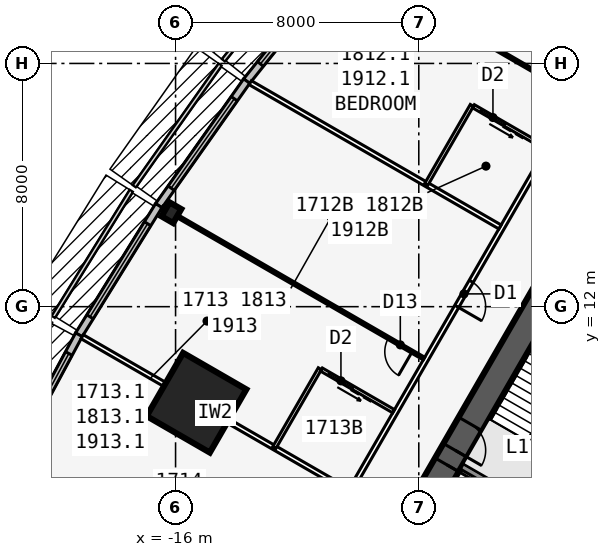
"""IFC4 building model, lengths in metres.
Left out: names, types, materials, properties, quantities, classifications, styles, units other than length and angle.
Written with IfcOpenShell. Run it as: python <this file> out.ifc"""

import sys

from ifc_helpers import new_model, si_unit, direction, frame, frame_2d, origin, origin_2d, place, context, subcontext, project, spatial, rectangle, i_section, extrude, element, fill, save


model = new_model("IFC4")
c1 = context("Model", 3, precision=1e-05, world=origin(), true_north=direction((0.0, 1.0)))
c2 = subcontext(c1, "Body", "Model", "MODEL_VIEW")
j1 = project(units=[si_unit("LENGTHUNIT", "METRE"), si_unit("PLANEANGLEUNIT", "RADIAN")], contexts=[c1])
p1 = place(None, origin())
s1 = spatial("IfcSite", under=j1, at=p1, CompositionType="ELEMENT")
p2 = place(p1, origin())
s2 = spatial("IfcBuilding", under=s1, at=p2, CompositionType="ELEMENT")
p3 = place(p2, frame((0.0, 0.0, 69.3)))
s3 = spatial("IfcBuildingStorey", under=s2, at=p3, CompositionType="ELEMENT", Elevation=69.3)
p4 = place(p3, frame((0.0, 19.052, 0.0), z_axis=(0.0, 0.0, 1.0), x_axis=(-0.499999749417, -0.866025548458, 0.0)))
e1 = element("IfcWall", 1, at=p4, inside=s3, PredefinedType="SHEAR", context=c2, shape_type="SweptSolid", body=[
    extrude(rectangle(XDim=33.0, YDim=0.9, at=frame_2d((16.5, 0.0))), origin(), (0.0, 0.0, 1.0), 3.4),
])
p5 = place(p4, frame((14.15, 0.0, 0.0)))
e2 = element("IfcOpeningElement", 2, at=p5, cuts=e1, PredefinedType="OPENING", context=c2, shape_type="SweptSolid", body=[
    extrude(rectangle(XDim=1.8, YDim=2.13, at=frame_2d((0.9, 1.065))), frame((0.0, 0.46, 0.0), z_axis=(0.0, -1.0, 0.0), x_axis=(1.0, 0.0, 0.0)), (0.0, 0.0, 1.0), 0.92),
])
p6 = place(p4, frame((12.6, 0.0, 0.0)))
e3 = element("IfcOpeningElement", 3, at=p6, cuts=e1, PredefinedType="OPENING", context=c2, shape_type="SweptSolid", body=[
    extrude(rectangle(XDim=1.0, YDim=2.13, at=frame_2d((0.5, 1.065))), frame((0.0, 0.46, 0.0), z_axis=(0.0, -1.0, 0.0), x_axis=(1.0, 0.0, 0.0)), (0.0, 0.0, 1.0), 0.92),
])
p7 = place(p3, frame((-3.879, 5.184, 0.0), z_axis=(0.0, 0.0, 1.0), x_axis=(-0.866022959057, 0.500004234368, 0.0)))
e4 = element("IfcWall", 4, at=p7, inside=s3, PredefinedType="SOLIDWALL", context=c2, shape_type="SweptSolid", body=[
    extrude(rectangle(XDim=3.125, YDim=0.2, at=frame_2d((1.562, 0.0))), origin(), (0.0, 0.0, 1.0), 3.235),
])
p8 = place(p3, frame((-16.137, 15.09, 0.0), z_axis=(0.0, 0.0, 1.0), x_axis=(-0.866025403784, 0.5, 0.0)))
e5 = element("IfcColumn", 5, at=p8, inside=s3, PredefinedType="COLUMN", context=c2, shape_type="SweptSolid", body=[
    extrude(i_section(OverallWidth=0.442, OverallDepth=0.531, WebThickness=0.066, FlangeThickness=0.106, at=origin_2d()), origin(), (0.0, 0.0, 1.0), 3.4),
])
p9 = place(p3, frame((-15.312, 8.84, 0.0), z_axis=(0.0, 0.0, 1.0), x_axis=(-0.866025403784, 0.5, 0.0)))
e6 = element("IfcColumn", 6, at=p9, inside=s3, PredefinedType="COLUMN", context=c2, shape_type="SweptSolid", body=[
    extrude(rectangle(XDim=2.4, YDim=2.4, at=origin_2d()), origin(), (0.0, 0.0, 1.0), 3.4),
])
p10 = place(p3, frame((-10.505, 23.364, 0.0), z_axis=(0.0, 0.0, 1.0), x_axis=(-0.624594965756, -0.780948864364, 0.0)))
e7 = element("IfcWall", 7, at=p10, inside=s3, PredefinedType="STANDARD", context=c2, shape_type="SweptSolid", body=[
    extrude(rectangle(XDim=5.058, YDim=0.25, at=frame_2d((2.529, 0.0))), origin(), (0.0, 0.0, 1.0), 3.235),
])
p11 = place(p10, frame((0.729, 0.0, 0.45)))
e8 = element("IfcOpeningElement", 8, at=p11, cuts=e7, PredefinedType="OPENING", context=c2, shape_type="SweptSolid", body=[
    extrude(rectangle(XDim=3.6, YDim=2.4, at=frame_2d((1.8, 1.2))), frame((0.0, 0.135, 0.0), z_axis=(0.0, -1.0, 0.0), x_axis=(1.0, 0.0, 0.0)), (0.0, 0.0, 1.0), 0.27),
])
p12 = place(p3, frame((-13.659, 19.42, 0.0), z_axis=(0.0, 0.0, 1.0), x_axis=(-0.5766431066, -0.81699616132, 0.0)))
e9 = element("IfcWall", 9, at=p12, inside=s3, PredefinedType="STANDARD", context=c2, shape_type="SweptSolid", body=[
    extrude(rectangle(XDim=5.021, YDim=0.25, at=frame_2d((2.51, 0.0))), origin(), (0.0, 0.0, 1.0), 3.235),
])
p13 = place(p12, frame((0.71, 0.0, 0.45)))
e10 = element("IfcOpeningElement", 10, at=p13, cuts=e9, PredefinedType="OPENING", context=c2, shape_type="SweptSolid", body=[
    extrude(rectangle(XDim=3.6, YDim=2.4, at=frame_2d((1.8, 1.2))), frame((0.0, 0.135, 0.0), z_axis=(0.0, -1.0, 0.0), x_axis=(1.0, 0.0, 0.0)), (0.0, 0.0, 1.0), 0.27),
])
p14 = place(p3, frame((-16.551, 15.324, 0.0), z_axis=(0.0, 0.0, 1.0), x_axis=(-0.526132807704, -0.850402415717, 0.0)))
e11 = element("IfcWall", 11, at=p14, inside=s3, PredefinedType="STANDARD", context=c2, shape_type="SweptSolid", body=[
    extrude(rectangle(XDim=5.002, YDim=0.25, at=frame_2d((2.501, 0.0))), origin(), (0.0, 0.0, 1.0), 3.235),
])
p15 = place(p14, frame((0.701, 0.0, 0.45)))
e12 = element("IfcOpeningElement", 12, at=p15, cuts=e11, PredefinedType="OPENING", context=c2, shape_type="SweptSolid", body=[
    extrude(rectangle(XDim=3.6, YDim=2.4, at=frame_2d((1.8, 1.2))), frame((0.0, 0.135, 0.0), z_axis=(0.0, -1.0, 0.0), x_axis=(1.0, 0.0, 0.0)), (0.0, 0.0, 1.0), 0.27),
])
p16 = place(p3, frame((-19.178, 11.077, 0.0), z_axis=(0.0, 0.0, 1.0), x_axis=(-0.473412820489, -0.880840678782, 0.0)))
e13 = element("IfcWall", 13, at=p16, inside=s3, PredefinedType="STANDARD", context=c2, shape_type="SweptSolid", body=[
    extrude(rectangle(XDim=5.002, YDim=0.25, at=frame_2d((2.501, 0.0))), origin(), (0.0, 0.0, 1.0), 3.235),
])
p17 = place(p16, frame((0.701, 0.0, 0.45)))
e14 = element("IfcOpeningElement", 14, at=p17, cuts=e13, PredefinedType="OPENING", context=c2, shape_type="SweptSolid", body=[
    extrude(rectangle(XDim=3.6, YDim=2.4, at=frame_2d((1.8, 1.2))), frame((0.0, 0.135, 0.0), z_axis=(0.0, -1.0, 0.0), x_axis=(1.0, 0.0, 0.0)), (0.0, 0.0, 1.0), 0.27),
])
p18 = place(p3, frame((-0.5, 22.836, 0.0), z_axis=(0.0, 0.0, 1.0), x_axis=(-0.500001677587, -0.866024435227, 0.0)))
e15 = element("IfcWall", 15, at=p18, inside=s3, PredefinedType="PARTITIONING", context=c2, shape_type="SweptSolid", body=[
    extrude(rectangle(XDim=39.054, YDim=0.15, at=frame_2d((19.527, 0.0))), origin(), (0.0, 0.0, 1.0), 3.235),
])
p19 = place(p18, frame((1.558, 0.0, 0.0)))
e16 = element("IfcOpeningElement", 16, at=p19, cuts=e15, PredefinedType="OPENING", context=c2, shape_type="SweptSolid", body=[
    extrude(rectangle(XDim=0.95, YDim=2.13, at=frame_2d((0.475, 1.065))), frame((0.0, 0.085, 0.0), z_axis=(0.0, -1.0, 0.0), x_axis=(1.0, 0.0, 0.0)), (0.0, 0.0, 1.0), 0.17),
])
p20 = place(p18, frame((11.552, 0.0, 0.0)))
e17 = element("IfcOpeningElement", 17, at=p20, cuts=e15, PredefinedType="OPENING", context=c2, shape_type="SweptSolid", body=[
    extrude(rectangle(XDim=0.95, YDim=2.13, at=frame_2d((0.475, 1.065))), frame((0.0, 0.085, 0.0), z_axis=(0.0, -1.0, 0.0), x_axis=(1.0, 0.0, 0.0)), (0.0, 0.0, 1.0), 0.17),
])
p21 = place(p18, frame((20.952, 0.0, 0.0)))
e18 = element("IfcOpeningElement", 18, at=p21, cuts=e15, PredefinedType="OPENING", context=c2, shape_type="SweptSolid", body=[
    extrude(rectangle(XDim=0.95, YDim=2.13, at=frame_2d((0.475, 1.065))), frame((0.0, 0.085, 0.0), z_axis=(0.0, -1.0, 0.0), x_axis=(1.0, 0.0, 0.0)), (0.0, 0.0, 1.0), 0.17),
])
p22 = place(p18, frame((27.752, 0.0, 0.0)))
e19 = element("IfcOpeningElement", 19, at=p22, cuts=e15, PredefinedType="OPENING", context=c2, shape_type="SweptSolid", body=[
    extrude(rectangle(XDim=0.95, YDim=2.13, at=frame_2d((0.475, 1.065))), frame((0.0, 0.085, 0.0), z_axis=(0.0, -1.0, 0.0), x_axis=(1.0, 0.0, 0.0)), (0.0, 0.0, 1.0), 0.17),
])
p23 = place(p18, frame((36.546, 0.0, 0.0)))
e20 = element("IfcOpeningElement", 20, at=p23, cuts=e15, PredefinedType="OPENING", context=c2, shape_type="SweptSolid", body=[
    extrude(rectangle(XDim=0.95, YDim=2.13, at=frame_2d((0.475, 1.065))), frame((0.0, 0.085, 0.0), z_axis=(0.0, -1.0, 0.0), x_axis=(1.0, 0.0, 0.0)), (0.0, 0.0, 1.0), 0.17),
])
p24 = place(p3, frame((-2.829, 18.954, 0.0), z_axis=(0.0, 0.0, 1.0), x_axis=(-0.866020536561, 0.500008430184, 0.0)))
e21 = element("IfcWall", 21, at=p24, inside=s3, PredefinedType="PARTITIONING", context=c2, shape_type="SweptSolid", body=[
    extrude(rectangle(XDim=8.72, YDim=0.1, at=frame_2d((4.36, 0.0))), origin(), (0.0, 0.0, 1.0), 2.389),
])
p25 = place(p24, frame((0.45, 0.0, 0.0)))
e22 = element("IfcOpeningElement", 22, at=p25, cuts=e21, PredefinedType="OPENING", context=c2, shape_type="SweptSolid", body=[
    extrude(rectangle(XDim=0.9, YDim=2.13, at=frame_2d((0.45, 1.065))), frame((0.0, 0.06, 0.0), z_axis=(0.0, -1.0, 0.0), x_axis=(1.0, 0.0, 0.0)), (0.0, 0.0, 1.0), 0.12),
])
p26 = place(p3, frame((-5.329, 14.623, 0.0), z_axis=(0.0, 0.0, 1.0), x_axis=(-0.866018409083, 0.500012114982, 0.0)))
e23 = element("IfcWall", 23, at=p26, inside=s3, PredefinedType="PARTITIONING", context=c2, shape_type="SweptSolid", body=[
    extrude(rectangle(XDim=9.485, YDim=0.15, at=frame_2d((4.742, 0.0))), origin(), (0.0, 0.0, 1.0), 2.389),
])
p27 = place(p3, frame((-7.829, 10.293, 0.0), z_axis=(0.0, 0.0, 1.0), x_axis=(-0.866016302457, 0.50001576363, 0.0)))
e24 = element("IfcWall", 24, at=p27, inside=s3, PredefinedType="PARTITIONING", context=c2, shape_type="SweptSolid", body=[
    extrude(rectangle(XDim=9.943, YDim=0.1, at=frame_2d((4.972, 0.0))), origin(), (0.0, 0.0, 1.0), 2.389),
])
p28 = place(p27, frame((0.45, 0.0, 0.0)))
e25 = element("IfcOpeningElement", 25, at=p28, cuts=e24, PredefinedType="OPENING", context=c2, shape_type="SweptSolid", body=[
    extrude(rectangle(XDim=0.9, YDim=2.13, at=frame_2d((0.45, 1.065))), frame((0.0, 0.06, 0.0), z_axis=(0.0, -1.0, 0.0), x_axis=(1.0, 0.0, 0.0)), (0.0, 0.0, 1.0), 0.12),
])
p29 = place(p3, frame((-10.329, 5.963, 0.0), z_axis=(0.0, 0.0, 1.0), x_axis=(-0.866021688545, 0.500006434927, 0.0)))
e26 = element("IfcWall", 26, at=p29, inside=s3, PredefinedType="PARTITIONING", context=c2, shape_type="SweptSolid", body=[
    extrude(rectangle(XDim=10.096, YDim=0.15, at=frame_2d((5.048, 0.0))), origin(), (0.0, 0.0, 1.0), 2.389),
])
p30 = place(p3, frame((-12.829, 1.633, 0.0), z_axis=(0.0, 0.0, 1.0), x_axis=(-0.866026934769, 0.499997348248, 0.0)))
e27 = element("IfcWall", 27, at=p30, inside=s3, PredefinedType="PARTITIONING", context=c2, shape_type="SweptSolid", body=[
    extrude(rectangle(XDim=9.943, YDim=0.15, at=frame_2d((4.971, 0.0))), origin(), (0.0, 0.0, 1.0), 2.389),
])
p31 = place(p3, frame((-6.253, 18.622, 0.0), z_axis=(0.0, 0.0, 1.0), x_axis=(-0.499990139034, -0.866031096941, 0.0)))
e28 = element("IfcWall", 28, at=p31, inside=s3, PredefinedType="PLUMBINGWALL", context=c2, shape_type="SweptSolid", body=[
    extrude(rectangle(XDim=3.0, YDim=0.12, at=frame_2d((1.5, 0.0))), origin(), (0.0, 0.0, 1.0), 3.235),
])
p32 = place(p3, frame((-3.829, 17.221, 0.0), z_axis=(0.0, 0.0, 1.0), x_axis=(-0.865997131366, 0.500048966069, 0.0)))
e29 = element("IfcWall", 29, at=p32, inside=s3, PredefinedType="PLUMBINGWALL", context=c2, shape_type="SweptSolid", body=[
    extrude(rectangle(XDim=2.74, YDim=0.12, at=frame_2d((1.37, 0.0))), origin(), (0.0, 0.0, 1.0), 3.235),
])
p33 = place(p32, frame((1.55, 0.0, 0.0)))
e30 = element("IfcOpeningElement", 30, at=p33, cuts=e29, PredefinedType="OPENING", context=c2, shape_type="SweptSolid", body=[
    extrude(rectangle(XDim=0.9, YDim=2.13, at=frame_2d((0.45, 1.065))), frame((0.0, 0.07, 0.0), z_axis=(0.0, -1.0, 0.0), x_axis=(1.0, 0.0, 0.0)), (0.0, 0.0, 1.0), 0.14),
])
p34 = place(p3, frame((-11.253, 9.961, 0.0), z_axis=(0.0, 0.0, 1.0), x_axis=(-0.499990139034, -0.866031096941, 0.0)))
e31 = element("IfcWall", 31, at=p34, inside=s3, PredefinedType="PLUMBINGWALL", context=c2, shape_type="SweptSolid", body=[
    extrude(rectangle(XDim=3.0, YDim=0.12, at=frame_2d((1.5, 0.0))), origin(), (0.0, 0.0, 1.0), 3.235),
])
p35 = place(p3, frame((-8.829, 8.561, 0.0), z_axis=(0.0, 0.0, 1.0), x_axis=(-0.866035715982, 0.499982138324, 0.0)))
e32 = element("IfcWall", 32, at=p35, inside=s3, PredefinedType="PLUMBINGWALL", context=c2, shape_type="SweptSolid", body=[
    extrude(rectangle(XDim=2.74, YDim=0.12, at=frame_2d((1.37, 0.0))), origin(), (0.0, 0.0, 1.0), 3.235),
])
p36 = place(p35, frame((1.55, 0.0, 0.0)))
e33 = element("IfcOpeningElement", 33, at=p36, cuts=e32, PredefinedType="OPENING", context=c2, shape_type="SweptSolid", body=[
    extrude(rectangle(XDim=0.9, YDim=2.13, at=frame_2d((0.45, 1.065))), frame((0.0, 0.07, 0.0), z_axis=(0.0, -1.0, 0.0), x_axis=(1.0, 0.0, 0.0)), (0.0, 0.0, 1.0), 0.14),
])
p37 = place(p3, frame((-2.988, 9.978, 0.0), z_axis=(0.0, 0.0, 1.0), x_axis=(-0.499992232847, -0.866029888106, 0.0)))
e34 = element("IfcWall", 34, at=p37, inside=s3, PredefinedType="SOLIDWALL", context=c2, shape_type="SweptSolid", body=[
    extrude(rectangle(XDim=2.794, YDim=0.1, at=frame_2d((1.397, 0.0))), origin(), (0.0, 0.0, 1.0), 3.4),
])
p38 = place(p11, origin())
e35 = element("IfcWindow", 35, at=p38, inside=s3, PartitioningType="SINGLE_PANEL", PredefinedType="WINDOW", context=c2, shape_type="SweptSolid", body=[
    extrude(rectangle(XDim=3.6, YDim=2.4, at=frame_2d((1.8, 1.2))), frame((0.0, 0.03, 0.0), z_axis=(0.0, -1.0, 0.0), x_axis=(1.0, 0.0, 0.0)), (0.0, 0.0, 1.0), 0.06),
])
fill(e8, e35)
p39 = place(p13, origin())
e36 = element("IfcWindow", 36, at=p39, inside=s3, PartitioningType="SINGLE_PANEL", PredefinedType="WINDOW", context=c2, shape_type="SweptSolid", body=[
    extrude(rectangle(XDim=3.6, YDim=2.4, at=frame_2d((1.8, 1.2))), frame((0.0, 0.03, 0.0), z_axis=(0.0, -1.0, 0.0), x_axis=(1.0, 0.0, 0.0)), (0.0, 0.0, 1.0), 0.06),
])
fill(e10, e36)
p40 = place(p15, origin())
e37 = element("IfcWindow", 37, at=p40, inside=s3, PartitioningType="SINGLE_PANEL", PredefinedType="WINDOW", context=c2, shape_type="SweptSolid", body=[
    extrude(rectangle(XDim=3.6, YDim=2.4, at=frame_2d((1.8, 1.2))), frame((0.0, 0.03, 0.0), z_axis=(0.0, -1.0, 0.0), x_axis=(1.0, 0.0, 0.0)), (0.0, 0.0, 1.0), 0.06),
])
fill(e12, e37)
p41 = place(p17, origin())
e38 = element("IfcWindow", 38, at=p41, inside=s3, PartitioningType="SINGLE_PANEL", PredefinedType="WINDOW", context=c2, shape_type="SweptSolid", body=[
    extrude(rectangle(XDim=3.6, YDim=2.4, at=frame_2d((1.8, 1.2))), frame((0.0, 0.03, 0.0), z_axis=(0.0, -1.0, 0.0), x_axis=(1.0, 0.0, 0.0)), (0.0, 0.0, 1.0), 0.06),
])
fill(e14, e38)
p42 = place(p28, origin())
e39 = element("IfcDoor", 39, at=p42, inside=s3, OperationType="SINGLE_SWING_LEFT", PredefinedType="DOOR", context=c2, shape_type="SweptSolid", body=[
    extrude(rectangle(XDim=0.9, YDim=2.13, at=frame_2d((0.45, 1.065))), frame((0.0, 0.025, 0.0), z_axis=(0.0, -1.0, 0.0), x_axis=(1.0, 0.0, 0.0)), (0.0, 0.0, 1.0), 0.05),
])
fill(e25, e39)
p43 = place(p33, origin())
e40 = element("IfcDoor", 40, at=p43, inside=s3, OperationType="SLIDING_TO_LEFT", PredefinedType="DOOR", context=c2, shape_type="SweptSolid", body=[
    extrude(rectangle(XDim=0.9, YDim=2.13, at=frame_2d((0.45, 1.065))), frame((0.0, 0.025, 0.0), z_axis=(0.0, -1.0, 0.0), x_axis=(1.0, 0.0, 0.0)), (0.0, 0.0, 1.0), 0.05),
])
fill(e30, e40)
p44 = place(p20, origin())
e41 = element("IfcDoor", 41, at=p44, inside=s3, OperationType="SINGLE_SWING_RIGHT", PredefinedType="DOOR", context=c2, shape_type="SweptSolid", body=[
    extrude(rectangle(XDim=0.95, YDim=2.13, at=frame_2d((0.475, 1.065))), frame((0.0, 0.025, 0.0), z_axis=(0.0, -1.0, 0.0), x_axis=(1.0, 0.0, 0.0)), (0.0, 0.0, 1.0), 0.05),
])
fill(e17, e41)
p45 = place(p36, origin())
e42 = element("IfcDoor", 42, at=p45, inside=s3, OperationType="SLIDING_TO_LEFT", PredefinedType="DOOR", context=c2, shape_type="SweptSolid", body=[
    extrude(rectangle(XDim=0.9, YDim=2.13, at=frame_2d((0.45, 1.065))), frame((0.0, 0.025, 0.0), z_axis=(0.0, -1.0, 0.0), x_axis=(1.0, 0.0, 0.0)), (0.0, 0.0, 1.0), 0.05),
])
fill(e33, e42)
p46 = place(p5, origin())
e43 = element("IfcDoor", 43, at=p46, inside=s3, OperationType="DOUBLE_DOOR_SINGLE_SWING", PredefinedType="DOOR", context=c2, shape_type="SweptSolid", body=[
    extrude(rectangle(XDim=1.8, YDim=2.13, at=frame_2d((0.9, 1.065))), frame((0.0, 0.025, 0.0), z_axis=(0.0, -1.0, 0.0), x_axis=(1.0, 0.0, 0.0)), (0.0, 0.0, 1.0), 0.05),
])
fill(e2, e43)
p47 = place(p6, origin())
e44 = element("IfcDoor", 44, at=p47, inside=s3, OperationType="SINGLE_SWING_RIGHT", PredefinedType="DOOR", context=c2, shape_type="SweptSolid", body=[
    extrude(rectangle(XDim=1.0, YDim=2.13, at=frame_2d((0.5, 1.065))), frame((0.0, 0.025, 0.0), z_axis=(0.0, -1.0, 0.0), x_axis=(1.0, 0.0, 0.0)), (0.0, 0.0, 1.0), 0.05),
])
fill(e3, e44)
save(model, sys.argv[1])
